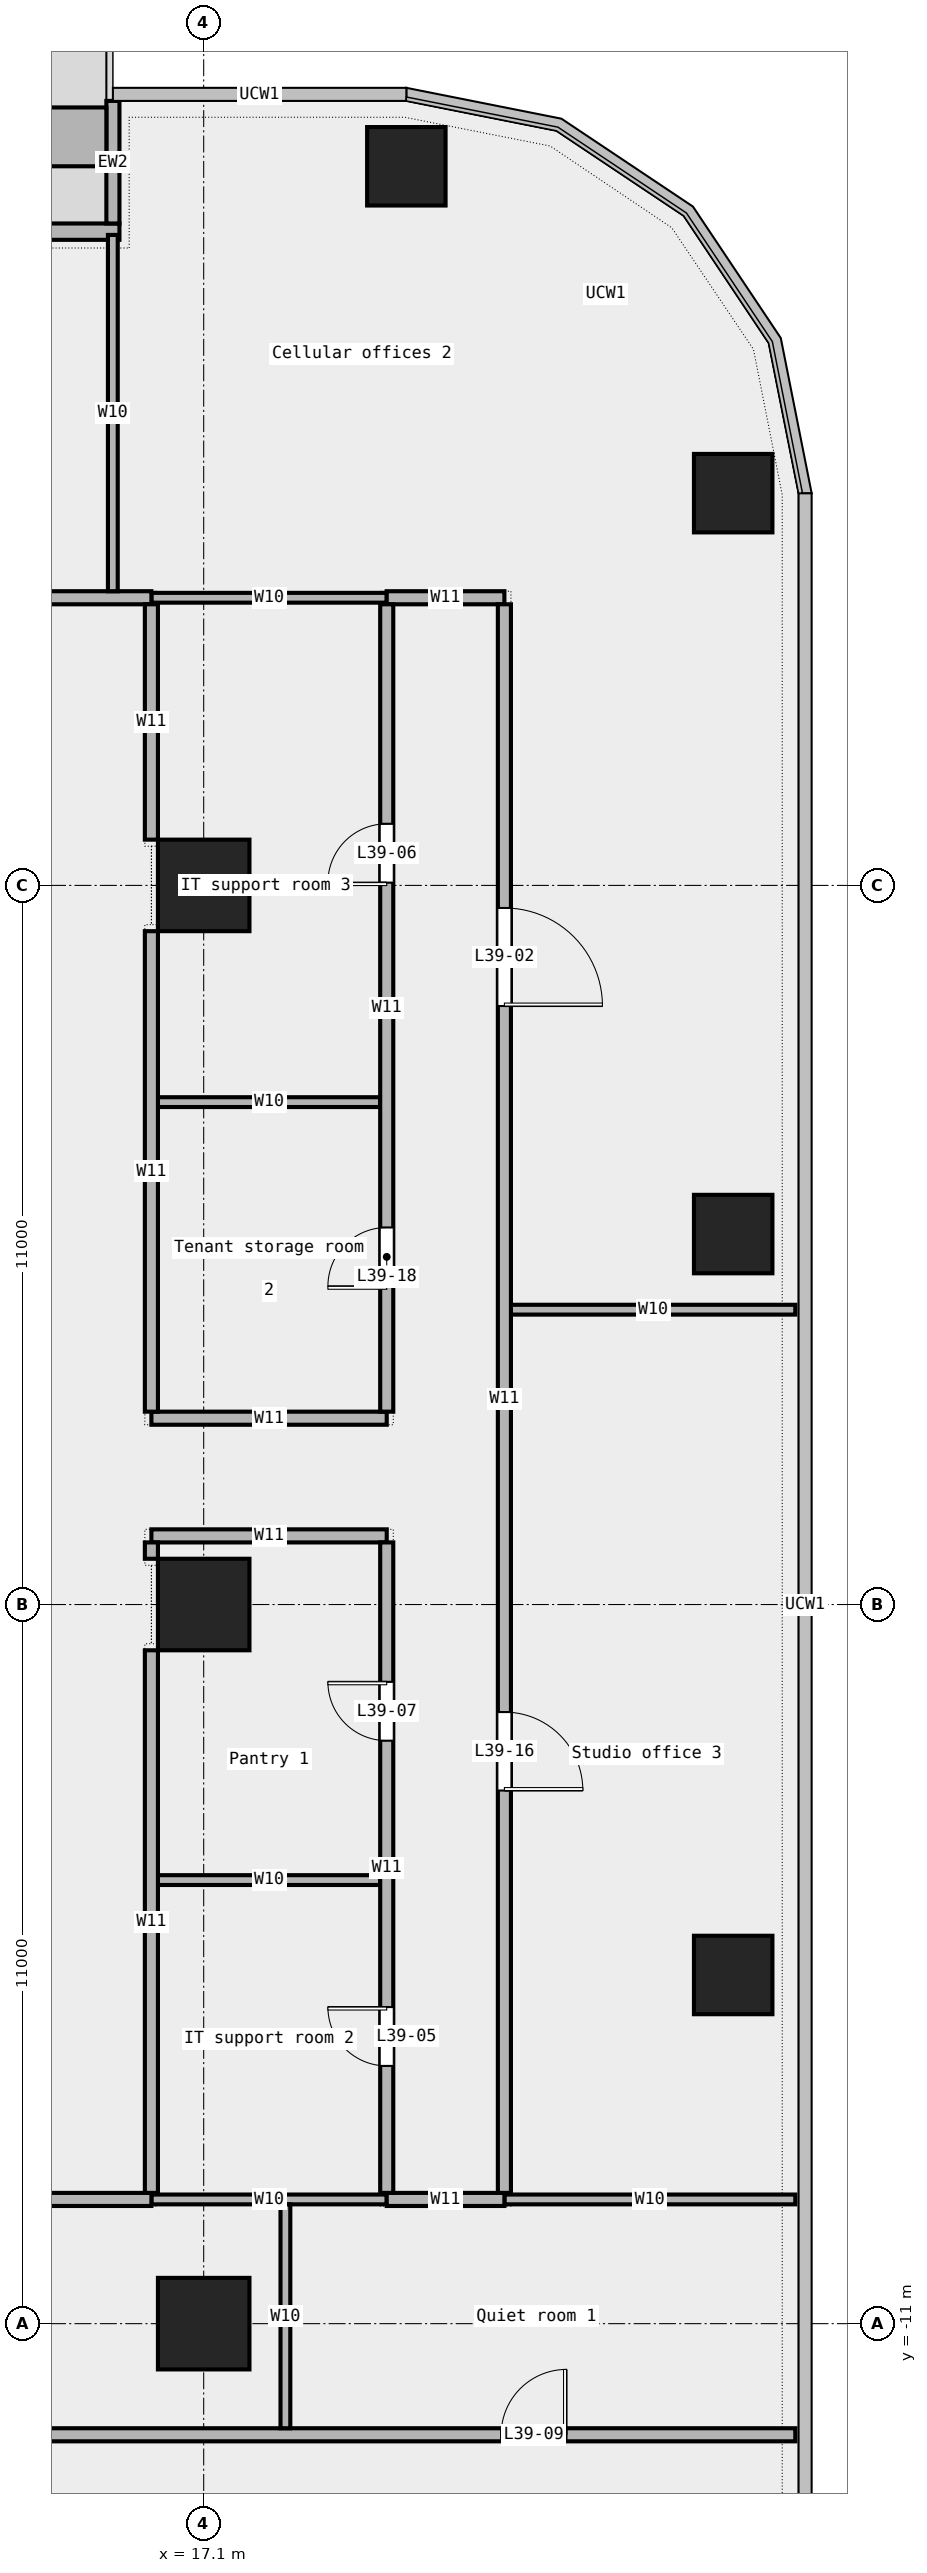
"""IFC4 building model, lengths in metres.
Left out: names, types, materials, properties, quantities, classifications, styles, units other than length and angle.
Written with IfcOpenShell. Run it as: python <this file> out.ifc"""

import sys

from ifc_helpers import new_model, si_unit, direction, frame, frame_2d, origin, origin_2d, place, context, subcontext, project, spatial, rectangle, extrude, element, fill, save


model = new_model("IFC4")
c1 = context("Model", 3, precision=1e-05, world=origin(), true_north=direction((0.0, 1.0)))
c2 = subcontext(c1, "Body", "Model", "MODEL_VIEW")
j1 = project(units=[si_unit("LENGTHUNIT", "METRE"), si_unit("PLANEANGLEUNIT", "RADIAN")], contexts=[c1])
p1 = place(None, origin())
s1 = spatial("IfcSite", under=j1, at=p1, CompositionType="ELEMENT")
p2 = place(p1, origin())
s2 = spatial("IfcBuilding", under=s1, at=p2, CompositionType="ELEMENT")
p3 = place(p2, frame((0.0, 0.0, 189.0)))
s3 = spatial("IfcBuildingStorey", under=s2, at=p3, CompositionType="ELEMENT", Elevation=189.0)
for number, where, z_axis, x_axis in (
    (1, (25.2, -5.667, 0.0), (0.0, 0.0, 1.0), (1.0, 0.0, 0.0)),
    (2, (25.2, 5.667, 0.0), (0.0, 0.0, 1.0), (1.0, 0.0, 0.0)),
    (3, (25.2, 17.0, 0.0), (0.0, 0.0, 1.0), (1.0, 0.0, 0.0)),
    (4, (20.2, 22.0, 0.0), (0.0, 0.0, 1.0), (1.0, 0.0, 0.0)),
):
    element("IfcColumn", number, at=place(p3, frame(where, z_axis=z_axis, x_axis=x_axis)), inside=s3, PredefinedType="COLUMN", context=c2, shape_type="SweptSolid", body=[
        extrude(rectangle(XDim=1.2, YDim=1.2, at=origin_2d()), origin(), (0.0, 0.0, 1.0), 3.6),
    ])
for number, where, z_axis, x_axis in (
    (5, (17.1, -11.0, 0.0), (0.0, 0.0, 1.0), (1.0, 0.0, 0.0)),
    (6, (17.1, 0.0, 0.0), (0.0, 0.0, 1.0), (1.0, 0.0, 0.0)),
    (7, (17.1, 11.0, 0.0), (0.0, 0.0, 1.0), (1.0, 0.0, 0.0)),
):
    element("IfcColumn", number, at=place(p3, frame(where, z_axis=z_axis, x_axis=x_axis)), inside=s3, PredefinedType="COLUMN", context=c2, shape_type="SweptSolid", body=[
        extrude(rectangle(XDim=1.4, YDim=1.4, at=origin_2d()), origin(), (0.0, 0.0, 1.0), 3.6),
    ])
p4 = place(p3, frame((15.811, 21.0, 0.0), z_axis=(0.0, 0.0, 1.0), x_axis=(-1.0, 0.0, 0.0)))
e8 = element("IfcWall", 8, at=p4, inside=s3, PredefinedType="STANDARD", context=c2, shape_type="SweptSolid", body=[
    extrude(rectangle(XDim=13.667, YDim=0.25, at=frame_2d((6.833, 0.0))), origin(), (0.0, 0.0, 1.0), 3.6),
])
p5 = place(p4, frame((1.75, 0.0, 0.45)))
e9 = element("IfcOpeningElement", 9, at=p5, cuts=e8, PredefinedType="OPENING", context=c2, shape_type="SweptSolid", body=[
    extrude(rectangle(XDim=1.5, YDim=2.4, at=frame_2d((0.75, 1.2))), frame((0.0, 0.137, 0.0), z_axis=(0.0, -1.0, 0.0), x_axis=(1.0, 0.0, 0.0)), (0.0, 0.0, 1.0), 0.274),
])
p6 = place(p4, frame((6.75, 0.0, 0.0)))
e10 = element("IfcOpeningElement", 10, at=p6, cuts=e8, PredefinedType="OPENING", context=c2, shape_type="SweptSolid", body=[
    extrude(rectangle(XDim=1.8, YDim=2.4, at=frame_2d((0.9, 1.2))), frame((0.0, 0.137, 0.0), z_axis=(0.0, -1.0, 0.0), x_axis=(1.0, 0.0, 0.0)), (0.0, 0.0, 1.0), 0.274),
])
p7 = place(p4, frame((10.5, 0.0, 0.45)))
e11 = element("IfcOpeningElement", 11, at=p7, cuts=e8, PredefinedType="OPENING", context=c2, shape_type="SweptSolid", body=[
    extrude(rectangle(XDim=1.5, YDim=2.4, at=frame_2d((0.75, 1.2))), frame((0.0, 0.137, 0.0), z_axis=(0.0, -1.0, 0.0), x_axis=(1.0, 0.0, 0.0)), (0.0, 0.0, 1.0), 0.274),
])
p8 = place(p3, frame((15.711, 23.0, 0.0), z_axis=(0.0, 0.0, 1.0), x_axis=(0.0, -1.0, 0.0)))
e12 = element("IfcWall", 12, at=p8, inside=s3, PredefinedType="STANDARD", context=c2, shape_type="SweptSolid", body=[
    extrude(rectangle(XDim=1.875, YDim=0.2, at=frame_2d((0.938, 0.0))), origin(), (0.0, 0.0, 1.0), 3.6),
])
p9 = place(p3, frame((15.611, 22.45, 0.0), z_axis=(0.0, 0.0, 1.0), x_axis=(-1.0, 0.0, 0.0)))
e13 = element("IfcWall", 13, at=p9, inside=s3, PredefinedType="STANDARD", context=c2, shape_type="SweptSolid", body=[
    extrude(rectangle(XDim=3.6, YDim=0.9, at=frame_2d((1.8, 0.0))), origin(), (0.0, 0.0, 1.0), 0.7),
])
p10 = place(p3, frame((0.9, -12.7, 0.0), z_axis=(0.0, 0.0, 1.0), x_axis=(1.0, 0.0, 0.0)))
e14 = element("IfcWall", 14, at=p10, inside=s3, PredefinedType="PARTITIONING", context=c2, shape_type="SweptSolid", body=[
    extrude(rectangle(XDim=25.25, YDim=0.2, at=frame_2d((12.625, 0.0))), origin(), (0.0, 0.0, 1.0), 3.6),
])
p11 = place(p10, frame((20.75, 0.0, 0.0)))
e15 = element("IfcOpeningElement", 15, at=p11, cuts=e14, PredefinedType="OPENING", context=c2, shape_type="SweptSolid", body=[
    extrude(rectangle(XDim=1.0, YDim=2.1, at=frame_2d((0.5, 1.05))), frame((0.0, 0.112, 0.0), z_axis=(0.0, -1.0, 0.0), x_axis=(1.0, 0.0, 0.0)), (0.0, 0.0, 1.0), 0.224),
])
p12 = place(p10, frame((8.125, 0.0, 0.0)))
e16 = element("IfcOpeningElement", 16, at=p12, cuts=e14, PredefinedType="OPENING", context=c2, shape_type="SweptSolid", body=[
    extrude(rectangle(XDim=1.2, YDim=2.1, at=frame_2d((0.6, 1.05))), frame((0.0, 0.112, 0.0), z_axis=(0.0, -1.0, 0.0), x_axis=(1.0, 0.0, 0.0)), (0.0, 0.0, 1.0), 0.224),
])
p13 = place(p3, frame((16.3, -9.1, 0.0), z_axis=(0.0, 0.0, 1.0), x_axis=(1.0, 0.0, 0.0)))
e17 = element("IfcWall", 17, at=p13, inside=s3, PredefinedType="PARTITIONING", context=c2, shape_type="SweptSolid", body=[
    extrude(rectangle(XDim=3.6, YDim=0.15, at=frame_2d((1.8, 0.0))), origin(), (0.0, 0.0, 1.0), 3.6),
])
p14 = place(p3, frame((21.7, -9.1, 0.0), z_axis=(0.0, 0.0, 1.0), x_axis=(1.0, 0.0, 0.0)))
e18 = element("IfcWall", 18, at=p14, inside=s3, PredefinedType="PARTITIONING", context=c2, shape_type="SweptSolid", body=[
    extrude(rectangle(XDim=4.45, YDim=0.15, at=frame_2d((2.225, 0.0))), origin(), (0.0, 0.0, 1.0), 3.6),
])
p15 = place(p3, frame((0.9, -9.1, 0.0), z_axis=(0.0, 0.0, 1.0), x_axis=(1.0, 0.0, 0.0)))
e19 = element("IfcWall", 19, at=p15, inside=s3, PredefinedType="PARTITIONING", context=c2, shape_type="SweptSolid", body=[
    extrude(rectangle(XDim=15.4, YDim=0.2, at=frame_2d((7.7, 0.0))), origin(), (0.0, 0.0, 1.0), 3.6),
])
p16 = place(p3, frame((19.9, -9.1, 0.0), z_axis=(0.0, 0.0, 1.0), x_axis=(1.0, 0.0, 0.0)))
e20 = element("IfcWall", 20, at=p16, inside=s3, PredefinedType="PARTITIONING", context=c2, shape_type="SweptSolid", body=[
    extrude(rectangle(XDim=1.8, YDim=0.2, at=frame_2d((0.9, 0.0))), origin(), (0.0, 0.0, 1.0), 3.6),
])
p17 = place(p3, frame((16.4, -4.215, 0.0), z_axis=(0.0, 0.0, 1.0), x_axis=(1.0, 0.0, 0.0)))
e21 = element("IfcWall", 21, at=p17, inside=s3, PredefinedType="PARTITIONING", context=c2, shape_type="SweptSolid", body=[
    extrude(rectangle(XDim=3.4, YDim=0.15, at=frame_2d((1.7, 0.0))), origin(), (0.0, 0.0, 1.0), 3.6),
])
for number, where, z_axis, x_axis in (
    (22, (16.3, 1.05, 0.0), (0.0, 0.0, 1.0), (1.0, 0.0, 0.0)),
    (23, (16.3, 2.85, 0.0), (0.0, 0.0, 1.0), (1.0, 0.0, 0.0)),
):
    element("IfcWall", number, at=place(p3, frame(where, z_axis=z_axis, x_axis=x_axis)), inside=s3, PredefinedType="PARTITIONING", context=c2, shape_type="SweptSolid", body=[
        extrude(rectangle(XDim=3.6, YDim=0.2, at=frame_2d((1.8, 0.0))), origin(), (0.0, 0.0, 1.0), 3.6),
    ])
p18 = place(p3, frame((21.8, 4.51, 0.0), z_axis=(0.0, 0.0, 1.0), x_axis=(1.0, 0.0, 0.0)))
e24 = element("IfcWall", 24, at=p18, inside=s3, PredefinedType="PARTITIONING", context=c2, shape_type="SweptSolid", body=[
    extrude(rectangle(XDim=4.35, YDim=0.15, at=frame_2d((2.175, 0.0))), origin(), (0.0, 0.0, 1.0), 3.6),
])
p19 = place(p3, frame((16.4, 7.685, 0.0), z_axis=(0.0, 0.0, 1.0), x_axis=(1.0, 0.0, 0.0)))
e25 = element("IfcWall", 25, at=p19, inside=s3, PredefinedType="PARTITIONING", context=c2, shape_type="SweptSolid", body=[
    extrude(rectangle(XDim=3.4, YDim=0.15, at=frame_2d((1.7, 0.0))), origin(), (0.0, 0.0, 1.0), 3.6),
])
p20 = place(p3, frame((16.3, 15.4, 0.0), z_axis=(0.0, 0.0, 1.0), x_axis=(1.0, 0.0, 0.0)))
e26 = element("IfcWall", 26, at=p20, inside=s3, PredefinedType="PARTITIONING", context=c2, shape_type="SweptSolid", body=[
    extrude(rectangle(XDim=3.6, YDim=0.15, at=frame_2d((1.8, 0.0))), origin(), (0.0, 0.0, 1.0), 3.6),
])
p21 = place(p3, frame((-16.3, 15.4, 0.0), z_axis=(0.0, 0.0, 1.0), x_axis=(1.0, 0.0, 0.0)))
e27 = element("IfcWall", 27, at=p21, inside=s3, PredefinedType="PARTITIONING", context=c2, shape_type="SweptSolid", body=[
    extrude(rectangle(XDim=32.6, YDim=0.2, at=frame_2d((16.3, 0.0))), origin(), (0.0, 0.0, 1.0), 3.6),
])
p22 = place(p21, frame((24.677, 0.0, 0.0)))
e28 = element("IfcOpeningElement", 28, at=p22, cuts=e27, PredefinedType="OPENING", context=c2, shape_type="SweptSolid", body=[
    extrude(rectangle(XDim=1.2, YDim=2.1, at=frame_2d((0.6, 1.05))), frame((0.0, 0.112, 0.0), z_axis=(0.0, -1.0, 0.0), x_axis=(1.0, 0.0, 0.0)), (0.0, 0.0, 1.0), 0.224),
])
p23 = place(p21, frame((4.805, 0.0, 0.0)))
e29 = element("IfcOpeningElement", 29, at=p23, cuts=e27, PredefinedType="OPENING", context=c2, shape_type="SweptSolid", body=[
    extrude(rectangle(XDim=1.5, YDim=2.1, at=frame_2d((0.75, 1.05))), frame((0.0, 0.112, 0.0), z_axis=(0.0, -1.0, 0.0), x_axis=(1.0, 0.0, 0.0)), (0.0, 0.0, 1.0), 0.224),
])
p24 = place(p21, frame((14.228, 0.0, 0.0)))
e30 = element("IfcOpeningElement", 30, at=p24, cuts=e27, PredefinedType="OPENING", context=c2, shape_type="SweptSolid", body=[
    extrude(rectangle(XDim=1.2, YDim=2.1, at=frame_2d((0.6, 1.05))), frame((0.0, 0.112, 0.0), z_axis=(0.0, -1.0, 0.0), x_axis=(1.0, 0.0, 0.0)), (0.0, 0.0, 1.0), 0.224),
])
p25 = place(p3, frame((19.9, 15.4, 0.0), z_axis=(0.0, 0.0, 1.0), x_axis=(1.0, 0.0, 0.0)))
e31 = element("IfcWall", 31, at=p25, inside=s3, PredefinedType="PARTITIONING", context=c2, shape_type="SweptSolid", body=[
    extrude(rectangle(XDim=1.8, YDim=0.2, at=frame_2d((0.9, 0.0))), origin(), (0.0, 0.0, 1.0), 3.6),
])
p26 = place(p3, frame((15.71, 15.5, 0.0), z_axis=(0.0, 0.0, 1.0), x_axis=(0.0, 1.0, 0.0)))
e32 = element("IfcWall", 32, at=p26, inside=s3, PredefinedType="PARTITIONING", context=c2, shape_type="SweptSolid", body=[
    extrude(rectangle(XDim=5.45, YDim=0.15, at=frame_2d((2.725, 0.0))), origin(), (0.0, 0.0, 1.0), 3.6),
])
p27 = place(p3, frame((16.3, -9.0, 0.0), z_axis=(0.0, 0.0, 1.0), x_axis=(0.0, 1.0, 0.0)))
e33 = element("IfcWall", 33, at=p27, inside=s3, PredefinedType="PARTITIONING", context=c2, shape_type="SweptSolid", body=[
    extrude(rectangle(XDim=8.3, YDim=0.2, at=frame_2d((4.15, 0.0))), origin(), (0.0, 0.0, 1.0), 3.6),
])
p28 = place(p3, frame((16.3, 0.7, 0.0), z_axis=(0.0, 0.0, 1.0), x_axis=(0.0, 1.0, 0.0)))
e34 = element("IfcWall", 34, at=p28, inside=s3, PredefinedType="PARTITIONING", context=c2, shape_type="SweptSolid", body=[
    extrude(rectangle(XDim=0.25, YDim=0.2, at=frame_2d((0.125, 0.0))), origin(), (0.0, 0.0, 1.0), 3.6),
])
p29 = place(p3, frame((16.3, 2.95, 0.0), z_axis=(0.0, 0.0, 1.0), x_axis=(0.0, 1.0, 0.0)))
e35 = element("IfcWall", 35, at=p29, inside=s3, PredefinedType="PARTITIONING", context=c2, shape_type="SweptSolid", body=[
    extrude(rectangle(XDim=7.35, YDim=0.2, at=frame_2d((3.675, 0.0))), origin(), (0.0, 0.0, 1.0), 3.6),
])
p30 = place(p3, frame((16.3, 11.7, 0.0), z_axis=(0.0, 0.0, 1.0), x_axis=(0.0, 1.0, 0.0)))
e36 = element("IfcWall", 36, at=p30, inside=s3, PredefinedType="PARTITIONING", context=c2, shape_type="SweptSolid", body=[
    extrude(rectangle(XDim=3.6, YDim=0.2, at=frame_2d((1.8, 0.0))), origin(), (0.0, 0.0, 1.0), 3.6),
])
p31 = place(p3, frame((18.35, -12.6, 0.0), z_axis=(0.0, 0.0, 1.0), x_axis=(0.0, 1.0, 0.0)))
e37 = element("IfcWall", 37, at=p31, inside=s3, PredefinedType="PARTITIONING", context=c2, shape_type="SweptSolid", body=[
    extrude(rectangle(XDim=3.425, YDim=0.15, at=frame_2d((1.712, 0.0))), origin(), (0.0, 0.0, 1.0), 3.6),
])
p32 = place(p3, frame((19.9, -9.0, 0.0), z_axis=(0.0, 0.0, 1.0), x_axis=(0.0, 1.0, 0.0)))
e38 = element("IfcWall", 38, at=p32, inside=s3, PredefinedType="PARTITIONING", context=c2, shape_type="SweptSolid", body=[
    extrude(rectangle(XDim=9.95, YDim=0.2, at=frame_2d((4.975, 0.0))), origin(), (0.0, 0.0, 1.0), 3.6),
])
p33 = place(p32, frame((1.942, 0.0, 0.0)))
e39 = element("IfcOpeningElement", 39, at=p33, cuts=e38, PredefinedType="OPENING", context=c2, shape_type="SweptSolid", body=[
    extrude(rectangle(XDim=0.9, YDim=2.1, at=frame_2d((0.45, 1.05))), frame((0.0, 0.112, 0.0), z_axis=(0.0, -1.0, 0.0), x_axis=(1.0, 0.0, 0.0)), (0.0, 0.0, 1.0), 0.224),
])
p34 = place(p32, frame((6.917, 0.0, 0.0)))
e40 = element("IfcOpeningElement", 40, at=p34, cuts=e38, PredefinedType="OPENING", context=c2, shape_type="SweptSolid", body=[
    extrude(rectangle(XDim=0.9, YDim=2.1, at=frame_2d((0.45, 1.05))), frame((0.0, 0.112, 0.0), z_axis=(0.0, -1.0, 0.0), x_axis=(1.0, 0.0, 0.0)), (0.0, 0.0, 1.0), 0.224),
])
p35 = place(p3, frame((19.9, 2.95, 0.0), z_axis=(0.0, 0.0, 1.0), x_axis=(0.0, 1.0, 0.0)))
e41 = element("IfcWall", 41, at=p35, inside=s3, PredefinedType="PARTITIONING", context=c2, shape_type="SweptSolid", body=[
    extrude(rectangle(XDim=12.35, YDim=0.2, at=frame_2d((6.175, 0.0))), origin(), (0.0, 0.0, 1.0), 3.6),
])
p36 = place(p35, frame((8.093, 0.0, 0.0)))
e42 = element("IfcOpeningElement", 42, at=p36, cuts=e41, PredefinedType="OPENING", context=c2, shape_type="SweptSolid", body=[
    extrude(rectangle(XDim=0.9, YDim=2.1, at=frame_2d((0.45, 1.05))), frame((0.0, 0.112, 0.0), z_axis=(0.0, -1.0, 0.0), x_axis=(1.0, 0.0, 0.0)), (0.0, 0.0, 1.0), 0.224),
])
p37 = place(p35, frame((1.917, 0.0, 0.0)))
e43 = element("IfcOpeningElement", 43, at=p37, cuts=e41, PredefinedType="OPENING", context=c2, shape_type="SweptSolid", body=[
    extrude(rectangle(XDim=0.9, YDim=2.1, at=frame_2d((0.45, 1.05))), frame((0.0, 0.112, 0.0), z_axis=(0.0, -1.0, 0.0), x_axis=(1.0, 0.0, 0.0)), (0.0, 0.0, 1.0), 0.224),
])
p38 = place(p3, frame((21.7, -9.0, 0.0), z_axis=(0.0, 0.0, 1.0), x_axis=(0.0, 1.0, 0.0)))
e44 = element("IfcWall", 44, at=p38, inside=s3, PredefinedType="PARTITIONING", context=c2, shape_type="SweptSolid", body=[
    extrude(rectangle(XDim=24.3, YDim=0.2, at=frame_2d((12.15, 0.0))), origin(), (0.0, 0.0, 1.0), 3.6),
])
p39 = place(p38, frame((18.155, 0.0, 0.0)))
e45 = element("IfcOpeningElement", 45, at=p39, cuts=e44, PredefinedType="OPENING", context=c2, shape_type="SweptSolid", body=[
    extrude(rectangle(XDim=1.5, YDim=2.1, at=frame_2d((0.75, 1.05))), frame((0.0, 0.112, 0.0), z_axis=(0.0, -1.0, 0.0), x_axis=(1.0, 0.0, 0.0)), (0.0, 0.0, 1.0), 0.224),
])
p40 = place(p38, frame((6.155, 0.0, 0.0)))
e46 = element("IfcOpeningElement", 46, at=p40, cuts=e44, PredefinedType="OPENING", context=c2, shape_type="SweptSolid", body=[
    extrude(rectangle(XDim=1.2, YDim=2.1, at=frame_2d((0.6, 1.05))), frame((0.0, 0.112, 0.0), z_axis=(0.0, -1.0, 0.0), x_axis=(1.0, 0.0, 0.0)), (0.0, 0.0, 1.0), 0.224),
])
p41 = place(p39, origin())
e47 = element("IfcDoor", 47, at=p41, inside=s3, OperationType="DOUBLE_DOOR_SINGLE_SWING", PredefinedType="DOOR", context=c2, shape_type="SweptSolid", body=[
    extrude(rectangle(XDim=1.5, YDim=2.1, at=frame_2d((0.75, 1.05))), frame((0.0, 0.025, 0.0), z_axis=(0.0, -1.0, 0.0), x_axis=(1.0, 0.0, 0.0)), (0.0, 0.0, 1.0), 0.05),
])
fill(e45, e47)
p42 = place(p33, origin())
e48 = element("IfcDoor", 48, at=p42, inside=s3, OperationType="SINGLE_SWING_RIGHT", PredefinedType="DOOR", context=c2, shape_type="SweptSolid", body=[
    extrude(rectangle(XDim=0.9, YDim=2.1, at=frame_2d((0.45, 1.05))), frame((0.0, 0.025, 0.0), z_axis=(0.0, -1.0, 0.0), x_axis=(1.0, 0.0, 0.0)), (0.0, 0.0, 1.0), 0.05),
])
fill(e39, e48)
p43 = place(p36, origin())
e49 = element("IfcDoor", 49, at=p43, inside=s3, OperationType="SINGLE_SWING_LEFT", PredefinedType="DOOR", context=c2, shape_type="SweptSolid", body=[
    extrude(rectangle(XDim=0.9, YDim=2.1, at=frame_2d((0.45, 1.05))), frame((0.0, 0.025, 0.0), z_axis=(0.0, -1.0, 0.0), x_axis=(1.0, 0.0, 0.0)), (0.0, 0.0, 1.0), 0.05),
])
fill(e42, e49)
p44 = place(p34, origin())
e50 = element("IfcDoor", 50, at=p44, inside=s3, OperationType="SINGLE_SWING_RIGHT", PredefinedType="DOOR", context=c2, shape_type="SweptSolid", body=[
    extrude(rectangle(XDim=0.9, YDim=2.1, at=frame_2d((0.45, 1.05))), frame((0.0, 0.025, 0.0), z_axis=(0.0, -1.0, 0.0), x_axis=(1.0, 0.0, 0.0)), (0.0, 0.0, 1.0), 0.05),
])
fill(e40, e50)
p45 = place(p11, origin())
e51 = element("IfcDoor", 51, at=p45, inside=s3, OperationType="SINGLE_SWING_RIGHT", PredefinedType="DOOR", context=c2, shape_type="SweptSolid", body=[
    extrude(rectangle(XDim=1.0, YDim=2.1, at=frame_2d((0.5, 1.05))), frame((0.0, 0.025, 0.0), z_axis=(0.0, -1.0, 0.0), x_axis=(1.0, 0.0, 0.0)), (0.0, 0.0, 1.0), 0.05),
])
fill(e15, e51)
p46 = place(p40, origin())
e52 = element("IfcDoor", 52, at=p46, inside=s3, OperationType="SINGLE_SWING_RIGHT", PredefinedType="DOOR", context=c2, shape_type="SweptSolid", body=[
    extrude(rectangle(XDim=1.2, YDim=2.1, at=frame_2d((0.6, 1.05))), frame((0.0, 0.025, 0.0), z_axis=(0.0, -1.0, 0.0), x_axis=(1.0, 0.0, 0.0)), (0.0, 0.0, 1.0), 0.05),
])
fill(e46, e52)
p47 = place(p37, origin())
e53 = element("IfcDoor", 53, at=p47, inside=s3, OperationType="SINGLE_SWING_LEFT", PredefinedType="DOOR", context=c2, shape_type="SweptSolid", body=[
    extrude(rectangle(XDim=0.9, YDim=2.1, at=frame_2d((0.45, 1.05))), frame((0.0, 0.025, 0.0), z_axis=(0.0, -1.0, 0.0), x_axis=(1.0, 0.0, 0.0)), (0.0, 0.0, 1.0), 0.05),
])
fill(e43, e53)
save(model, sys.argv[1])
